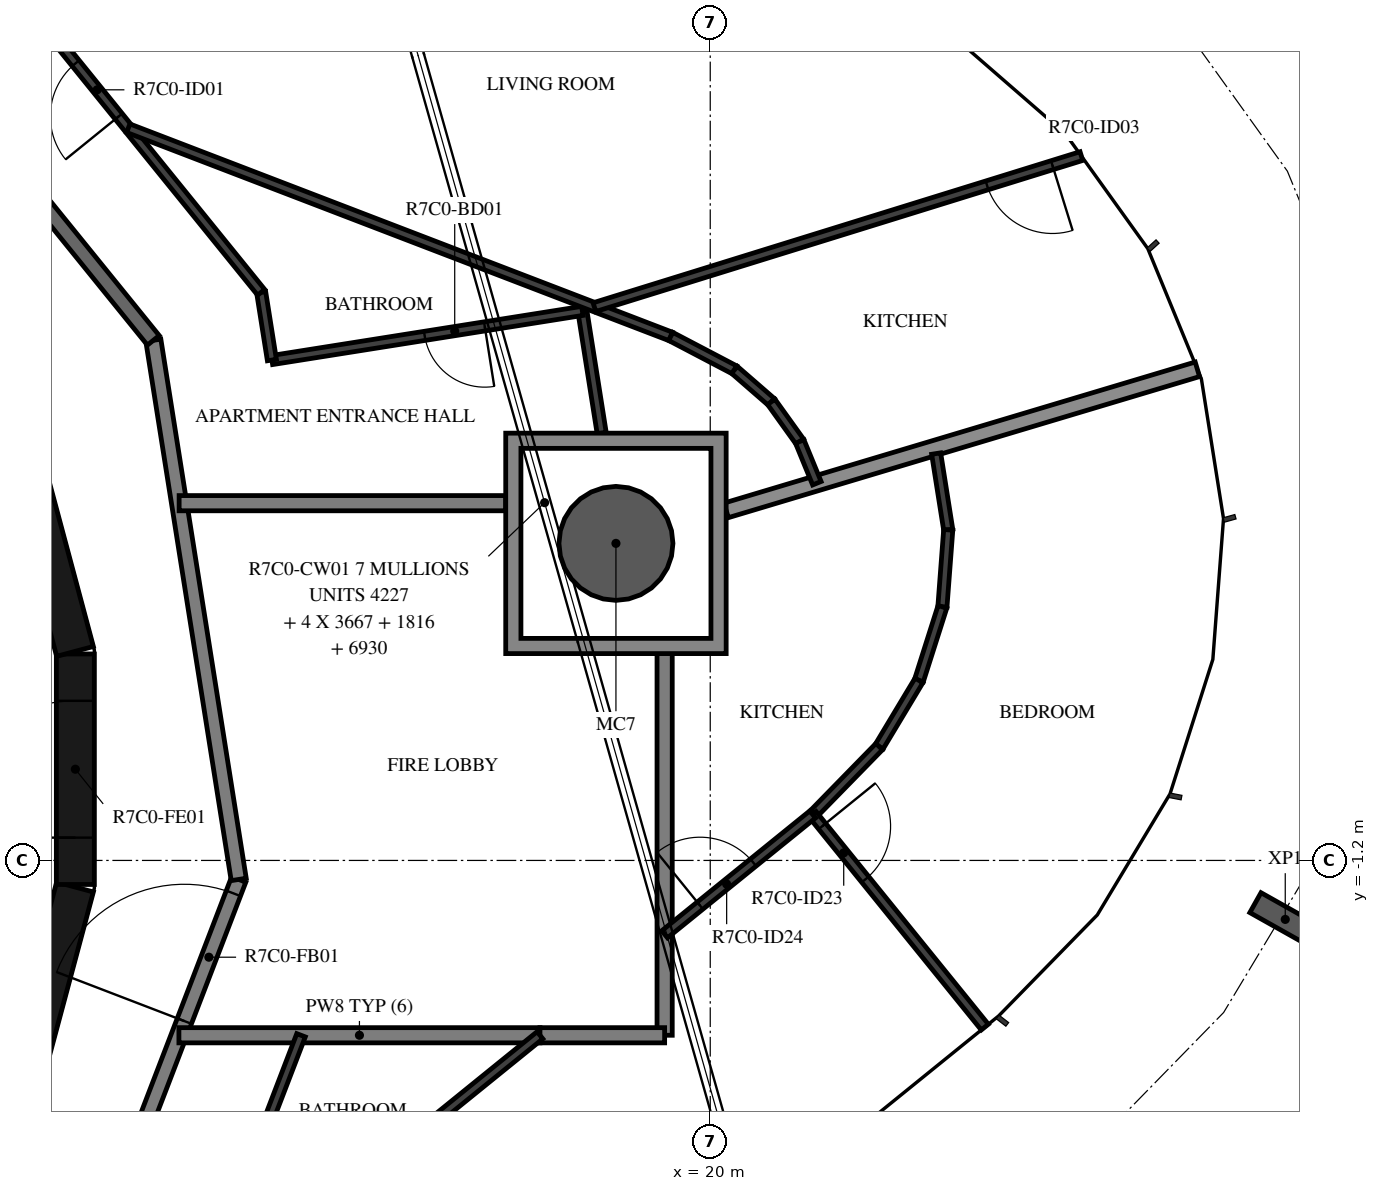
"""IFC4 building model, lengths in metres.
Left out: names, types, materials, properties, quantities, classifications, styles, units other than length and angle.
Written with IfcOpenShell. Run it as: python <this file> out.ifc"""

import sys

from ifc_helpers import new_model, si_unit, direction, frame, frame_2d, origin, origin_2d, place, context, subcontext, project, spatial, polyline, rectangle, hollow_circle, i_section, outline, extrude, element, fill, save


model = new_model("IFC4")
c1 = context("Model", 3, precision=1e-05, world=origin(), true_north=direction((0.0, 1.0)))
c2 = subcontext(c1, "Body", "Model", "MODEL_VIEW")
j1 = project(units=[si_unit("LENGTHUNIT", "METRE"), si_unit("PLANEANGLEUNIT", "RADIAN")], contexts=[c1])
p1 = place(None, origin())
s1 = spatial("IfcSite", under=j1, at=p1, CompositionType="ELEMENT")
p2 = place(p1, origin())
s2 = spatial("IfcBuilding", under=s1, at=p2, CompositionType="ELEMENT")
p3 = place(p2, frame((0.0, 0.0, 284.4)))
s3 = spatial("IfcBuildingStorey", under=s2, at=p3, CompositionType="ELEMENT", Elevation=284.4)
p4 = place(p3, frame((18.76, 2.971, -0.38), z_axis=(0.0, 0.0, 1.0), x_axis=(1.0, 0.0, 0.0)))
e1 = element("IfcColumn", 1, at=p4, inside=s3, PredefinedType="COLUMN", context=c2, shape_type="SweptSolid", body=[
    extrude(hollow_circle(Radius=0.75, WallThickness=0.035, at=origin_2d()), origin(), (0.0, 0.0, 1.0), 3.5),
])
p5 = place(p3, frame((27.565, -1.976, -0.38), z_axis=(0.0, 0.0, 1.0), x_axis=(-0.489802299008, -0.871833532211, 0.0)))
e2 = element("IfcColumn", 2, at=p5, inside=s3, PredefinedType="COLUMN", context=c2, shape_type="SweptSolid", body=[
    extrude(i_section(OverallWidth=0.3, OverallDepth=0.9, WebThickness=0.019, FlangeThickness=0.035, FilletRadius=0.03, at=origin_2d()), origin(), (0.0, 0.0, 1.0), 3.5),
])
p6 = place(p3, frame((10.858, -4.479, 0.0), z_axis=(0.0, 0.0, 1.0), x_axis=(0.258734743916, 0.965948410781, 0.0)))
e3 = element("IfcWall", 3, at=p6, inside=s3, PredefinedType="SHEAR", context=c2, shape_type="SweptSolid", body=[
    extrude(rectangle(XDim=3.033, YDim=0.5, at=frame_2d((1.516, 0.0))), origin(), (0.0, 0.0, 1.0), 3.12),
])
p7 = place(p3, frame((11.647, -1.516, 0.0), z_axis=(0.0, 0.0, 1.0), x_axis=(0.0, 1.0, 0.0)))
e4 = element("IfcWall", 4, at=p7, inside=s3, PredefinedType="SHEAR", context=c2, shape_type="SweptSolid", body=[
    extrude(rectangle(XDim=3.033, YDim=0.5, at=frame_2d((1.516, 0.0))), origin(), (0.0, 0.0, 1.0), 3.12),
])
p8 = place(p7, frame((0.616, 0.0, 0.0)))
e5 = element("IfcOpeningElement", 5, at=p8, cuts=e4, PredefinedType="OPENING", context=c2, shape_type="SweptSolid", body=[
    extrude(rectangle(XDim=1.8, YDim=2.1, at=frame_2d((0.9, 1.05))), frame((0.0, 0.26, 0.0), z_axis=(0.0, -1.0, 0.0), x_axis=(1.0, 0.0, 0.0)), (0.0, 0.0, 1.0), 0.52),
])
p9 = place(p3, frame((11.643, 1.55, 0.0), z_axis=(0.0, 0.0, 1.0), x_axis=(-0.258734743916, 0.965948410781, 0.0)))
e6 = element("IfcWall", 6, at=p9, inside=s3, PredefinedType="SHEAR", context=c2, shape_type="SweptSolid", body=[
    extrude(rectangle(XDim=3.033, YDim=0.5, at=frame_2d((1.516, 0.0))), origin(), (0.0, 0.0, 1.0), 3.12),
])
p10 = place(p3, frame((11.223, -8.154, 0.0), z_axis=(0.0, 0.0, 1.0), x_axis=(0.358341090983, 0.93359073609, 0.0)))
e7 = element("IfcWall", 7, at=p10, inside=s3, PredefinedType="STANDARD", context=c2, shape_type="SweptSolid", body=[
    extrude(rectangle(XDim=7.181, YDim=0.2, at=frame_2d((3.59, 0.0))), origin(), (0.0, 0.0, 1.0), 3.12),
])
p11 = place(p10, frame((5.185, 0.0, 0.0)))
e8 = element("IfcOpeningElement", 8, at=p11, cuts=e7, PredefinedType="OPENING", context=c2, shape_type="SweptSolid", body=[
    extrude(rectangle(XDim=1.8, YDim=2.1, at=frame_2d((0.9, 1.05))), frame((0.0, 0.11, 0.0), z_axis=(0.0, -1.0, 0.0), x_axis=(1.0, 0.0, 0.0)), (0.0, 0.0, 1.0), 0.22),
])
p12 = place(p3, frame((13.797, -1.45, 0.0), z_axis=(0.0, 0.0, 1.0), x_axis=(-0.156421704315, 0.987690361611, 0.0)))
e9 = element("IfcWall", 9, at=p12, inside=s3, PredefinedType="STANDARD", context=c2, shape_type="SweptSolid", body=[
    extrude(rectangle(XDim=7.181, YDim=0.2, at=frame_2d((3.591, 0.0))), origin(), (0.0, 0.0, 1.0), 3.12),
])
p13 = place(p3, frame((12.673, 5.643, 0.0), z_axis=(0.0, 0.0, 1.0), x_axis=(-0.629302871585, 0.777160148113, 0.0)))
e10 = element("IfcWall", 10, at=p13, inside=s3, PredefinedType="STANDARD", context=c2, shape_type="SweptSolid", body=[
    extrude(rectangle(XDim=7.181, YDim=0.2, at=frame_2d((3.59, 0.0))), origin(), (0.0, 0.0, 1.0), 3.12),
])
p14 = place(p13, frame((4.1, 0.0, 0.0)))
e11 = element("IfcOpeningElement", 11, at=p14, cuts=e10, PredefinedType="OPENING", context=c2, shape_type="SweptSolid", body=[
    extrude(rectangle(XDim=1.0, YDim=2.1, at=frame_2d((0.5, 1.05))), frame((0.0, 0.11, 0.0), z_axis=(0.0, -1.0, 0.0), x_axis=(1.0, 0.0, 0.0)), (0.0, 0.0, 1.0), 0.22),
])
p15 = place(p3, frame((17.309, 3.5, 0.0), z_axis=(0.0, 0.0, 1.0), x_axis=(-1.0, 0.0, 0.0)))
e12 = element("IfcWall", 12, at=p15, inside=s3, PredefinedType="STANDARD", context=c2, shape_type="SweptSolid", body=[
    extrude(rectangle(XDim=4.297, YDim=0.2, at=frame_2d((2.148, 0.0))), origin(), (0.0, 0.0, 1.0), 3.12),
])
p16 = place(p3, frame((13.01, -3.5, 0.0), z_axis=(0.0, 0.0, 1.0), x_axis=(1.0, 0.0, 0.0)))
e13 = element("IfcWall", 13, at=p16, inside=s3, PredefinedType="STANDARD", context=c2, shape_type="SweptSolid", body=[
    extrude(rectangle(XDim=4.75, YDim=0.2, at=frame_2d((2.375, 0.0))), origin(), (0.0, 0.0, 1.0), 3.12),
])
p17 = place(p3, frame((19.4, -3.5, 0.0), z_axis=(0.0, 0.0, 1.0), x_axis=(0.0, 1.0, 0.0)))
e14 = element("IfcWall", 14, at=p17, inside=s3, PredefinedType="STANDARD", context=c2, shape_type="SweptSolid", body=[
    extrude(rectangle(XDim=5.021, YDim=0.2, at=frame_2d((2.511, 0.0))), origin(), (0.0, 0.0, 1.0), 3.12),
])
p18 = place(p3, frame((17.76, -3.5, 0.0), z_axis=(0.0, 0.0, 1.0), x_axis=(1.0, 0.0, 0.0)))
e15 = element("IfcWall", 15, at=p18, inside=s3, PredefinedType="STANDARD", context=c2, shape_type="SweptSolid", body=[
    extrude(rectangle(XDim=1.64, YDim=0.2, at=frame_2d((0.82, 0.0))), origin(), (0.0, 0.0, 1.0), 3.12),
])
p19 = place(p3, frame((20.209, 3.405, 0.0), z_axis=(0.0, 0.0, 1.0), x_axis=(0.957991224208, 0.286797514529, 0.0)))
e16 = element("IfcWall", 16, at=p19, inside=s3, PredefinedType="STANDARD", context=c2, shape_type="SweptSolid", body=[
    extrude(rectangle(XDim=6.471, YDim=0.2, at=frame_2d((3.236, 0.0))), origin(), (0.0, 0.0, 1.0), 2.73),
])
p20 = place(p3, frame((18.572, 4.421, 0.0), z_axis=(0.0, 0.0, 1.0), x_axis=(-0.156347444306, 0.987702119396, 0.0)))
e17 = element("IfcWall", 17, at=p20, inside=s3, PredefinedType="PARTITIONING", context=c2, shape_type="SweptSolid", body=[
    extrude(rectangle(XDim=1.629, YDim=0.12, at=frame_2d((0.814, 0.0))), origin(), (0.0, 0.0, 1.0), 3.12),
])
p21 = place(p3, frame((18.317, 6.03, 0.0), z_axis=(0.0, 0.0, 1.0), x_axis=(-0.9876848128, -0.156456737039, 0.0)))
e18 = element("IfcWall", 18, at=p21, inside=s3, PredefinedType="PARTITIONING", context=c2, shape_type="SweptSolid", body=[
    extrude(rectangle(XDim=4.135, YDim=0.12, at=frame_2d((2.068, 0.0))), origin(), (0.0, 0.0, 1.0), 3.12),
])
p22 = place(p21, frame((1.3, 0.0, 0.0)))
e19 = element("IfcOpeningElement", 19, at=p22, cuts=e18, PredefinedType="OPENING", context=c2, shape_type="SweptSolid", body=[
    extrude(rectangle(XDim=0.8, YDim=2.1, at=frame_2d((0.4, 1.05))), frame((0.0, 0.07, 0.0), z_axis=(0.0, -1.0, 0.0), x_axis=(1.0, 0.0, 0.0)), (0.0, 0.0, 1.0), 0.14),
])
p23 = place(p3, frame((14.233, 5.383, 0.0), z_axis=(0.0, 0.0, 1.0), x_axis=(-0.156365428504, 0.987699272435, 0.0)))
e20 = element("IfcWall", 20, at=p23, inside=s3, PredefinedType="PARTITIONING", context=c2, shape_type="SweptSolid", body=[
    extrude(rectangle(XDim=0.902, YDim=0.12, at=frame_2d((0.451, 0.0))), origin(), (0.0, 0.0, 1.0), 3.12),
])
p24 = place(p3, frame((14.092, 6.274, 0.0), z_axis=(0.0, 0.0, 1.0), x_axis=(-0.62933367237, 0.777135206268, 0.0)))
e21 = element("IfcWall", 21, at=p24, inside=s3, PredefinedType="PARTITIONING", context=c2, shape_type="SweptSolid", body=[
    extrude(rectangle(XDim=7.985, YDim=0.12, at=frame_2d((3.992, 0.0))), origin(), (0.0, 0.0, 1.0), 3.12),
])
p25 = place(p24, frame((2.978, 0.0, 0.0)))
e22 = element("IfcOpeningElement", 22, at=p25, cuts=e21, PredefinedType="OPENING", context=c2, shape_type="SweptSolid", body=[
    extrude(rectangle(XDim=0.9, YDim=2.1, at=frame_2d((0.45, 1.05))), frame((0.0, 0.07, 0.0), z_axis=(0.0, -1.0, 0.0), x_axis=(1.0, 0.0, 0.0)), (0.0, 0.0, 1.0), 0.14),
])
p26 = place(p24, frame((4.749, 0.0, 0.0)))
e23 = element("IfcOpeningElement", 23, at=p26, cuts=e21, PredefinedType="OPENING", context=c2, shape_type="SweptSolid", body=[
    extrude(rectangle(XDim=0.9, YDim=2.1, at=frame_2d((0.45, 1.05))), frame((0.0, 0.07, 0.0), z_axis=(0.0, -1.0, 0.0), x_axis=(1.0, 0.0, 0.0)), (0.0, 0.0, 1.0), 0.14),
])
p27 = place(p3, frame((12.344, 8.433, 0.0), z_axis=(0.0, 0.0, 1.0), x_axis=(0.933573435176, -0.358386162029, 0.0)))
e24 = element("IfcWall", 24, at=p27, inside=s3, PredefinedType="PARTITIONING", context=c2, shape_type="SweptSolid", body=[
    extrude(rectangle(XDim=7.644, YDim=0.12, at=frame_2d((3.822, 0.0))), origin(), (0.0, 0.0, 1.0), 3.12),
])
p28 = place(p3, frame((19.48, 5.694, 0.0), z_axis=(0.0, 0.0, 1.0), x_axis=(0.885755816688, -0.464151519662, 0.0)))
e25 = element("IfcWall", 25, at=p28, inside=s3, PredefinedType="PARTITIONING", context=c2, shape_type="SweptSolid", body=[
    extrude(rectangle(XDim=0.947, YDim=0.12, at=frame_2d((0.473, 0.0))), origin(), (0.0, 0.0, 1.0), 3.12),
])
p29 = place(p3, frame((20.319, 5.254, 0.0), z_axis=(0.0, 0.0, 1.0), x_axis=(0.754646464307, -0.656131628493, 0.0)))
e26 = element("IfcWall", 26, at=p29, inside=s3, PredefinedType="PARTITIONING", context=c2, shape_type="SweptSolid", body=[
    extrude(rectangle(XDim=0.642, YDim=0.12, at=frame_2d((0.321, 0.0))), origin(), (0.0, 0.0, 1.0), 3.12),
])
p30 = place(p3, frame((20.803, 4.833, 0.0), z_axis=(0.0, 0.0, 1.0), x_axis=(0.583322588112, -0.812240579014, 0.0)))
e27 = element("IfcWall", 27, at=p30, inside=s3, PredefinedType="PARTITIONING", context=c2, shape_type="SweptSolid", body=[
    extrude(rectangle(XDim=0.642, YDim=0.12, at=frame_2d((0.321, 0.0))), origin(), (0.0, 0.0, 1.0), 3.12),
])
p31 = place(p3, frame((21.177, 4.312, 0.0), z_axis=(0.0, 0.0, 1.0), x_axis=(0.379673715705, -0.925120462212, 0.0)))
e28 = element("IfcWall", 28, at=p31, inside=s3, PredefinedType="PARTITIONING", context=c2, shape_type="SweptSolid", body=[
    extrude(rectangle(XDim=0.594, YDim=0.12, at=frame_2d((0.297, 0.0))), origin(), (0.0, 0.0, 1.0), 3.12),
])
p32 = place(p3, frame((24.883, 8.066, 0.0), z_axis=(0.0, 0.0, 1.0), x_axis=(-0.955106049863, -0.296264127958, 0.0)))
e29 = element("IfcWall", 29, at=p32, inside=s3, PredefinedType="PARTITIONING", context=c2, shape_type="SweptSolid", body=[
    extrude(rectangle(XDim=6.708, YDim=0.12, at=frame_2d((3.354, 0.0))), origin(), (0.0, 0.0, 1.0), 3.12),
])
p33 = place(p32, frame((0.4, 0.0, 0.0)))
e30 = element("IfcOpeningElement", 30, at=p33, cuts=e29, PredefinedType="OPENING", context=c2, shape_type="SweptSolid", body=[
    extrude(rectangle(XDim=0.9, YDim=2.1, at=frame_2d((0.45, 1.05))), frame((0.0, 0.07, 0.0), z_axis=(0.0, -1.0, 0.0), x_axis=(1.0, 0.0, 0.0)), (0.0, 0.0, 1.0), 0.14),
])
p34 = place(p3, frame((12.505, -9.001, 0.0), z_axis=(0.0, 0.0, 1.0), x_axis=(0.358373707046, 0.933578216379, 0.0)))
e31 = element("IfcWall", 31, at=p34, inside=s3, PredefinedType="PARTITIONING", context=c2, shape_type="SweptSolid", body=[
    extrude(rectangle(XDim=5.892, YDim=0.12, at=frame_2d((2.946, 0.0))), origin(), (0.0, 0.0, 1.0), 3.12),
])
p35 = place(p34, frame((0.2, 0.0, 0.0)))
e32 = element("IfcOpeningElement", 32, at=p35, cuts=e31, PredefinedType="OPENING", context=c2, shape_type="SweptSolid", body=[
    extrude(rectangle(XDim=0.9, YDim=2.1, at=frame_2d((0.45, 1.05))), frame((0.0, 0.07, 0.0), z_axis=(0.0, -1.0, 0.0), x_axis=(1.0, 0.0, 0.0)), (0.0, 0.0, 1.0), 0.14),
])
p36 = place(p34, frame((3.436, 0.0, 0.0)))
e33 = element("IfcOpeningElement", 33, at=p36, cuts=e31, PredefinedType="OPENING", context=c2, shape_type="SweptSolid", body=[
    extrude(rectangle(XDim=0.8, YDim=2.1, at=frame_2d((0.4, 1.05))), frame((0.0, 0.07, 0.0), z_axis=(0.0, -1.0, 0.0), x_axis=(1.0, 0.0, 0.0)), (0.0, 0.0, 1.0), 0.14),
])
p37 = place(p3, frame((22.972, 4.153, 0.0), z_axis=(0.0, 0.0, 1.0), x_axis=(0.156209385929, -0.987723963336, 0.0)))
e34 = element("IfcWall", 34, at=p37, inside=s3, PredefinedType="PARTITIONING", context=c2, shape_type="SweptSolid", body=[
    extrude(rectangle(XDim=1.016, YDim=0.12, at=frame_2d((0.508, 0.0))), origin(), (0.0, 0.0, 1.0), 3.12),
])
p38 = place(p3, frame((23.131, 3.149, 0.0), z_axis=(0.0, 0.0, 1.0), x_axis=(-0.075446997935, -0.99714981347, 0.0)))
e35 = element("IfcWall", 35, at=p38, inside=s3, PredefinedType="PARTITIONING", context=c2, shape_type="SweptSolid", body=[
    extrude(rectangle(XDim=1.016, YDim=0.12, at=frame_2d((0.508, 0.0))), origin(), (0.0, 0.0, 1.0), 3.12),
])
p39 = place(p3, frame((23.054, 2.136, 0.0), z_axis=(0.0, 0.0, 1.0), x_axis=(-0.303511129679, -0.952827893253, 0.0)))
e36 = element("IfcWall", 36, at=p39, inside=s3, PredefinedType="PARTITIONING", context=c2, shape_type="SweptSolid", body=[
    extrude(rectangle(XDim=1.016, YDim=0.12, at=frame_2d((0.508, 0.0))), origin(), (0.0, 0.0, 1.0), 3.12),
])
p40 = place(p3, frame((22.746, 1.168, 0.0), z_axis=(0.0, 0.0, 1.0), x_axis=(-0.515096534995, -0.857132171626, 0.0)))
e37 = element("IfcWall", 37, at=p40, inside=s3, PredefinedType="PARTITIONING", context=c2, shape_type="SweptSolid", body=[
    extrude(rectangle(XDim=1.016, YDim=0.12, at=frame_2d((0.508, 0.0))), origin(), (0.0, 0.0, 1.0), 3.12),
])
p41 = place(p3, frame((22.223, 0.298, 0.0), z_axis=(0.0, 0.0, 1.0), x_axis=(-0.69880109182, -0.715316037896, 0.0)))
e38 = element("IfcWall", 38, at=p41, inside=s3, PredefinedType="PARTITIONING", context=c2, shape_type="SweptSolid", body=[
    extrude(rectangle(XDim=1.227, YDim=0.12, at=frame_2d((0.614, 0.0))), origin(), (0.0, 0.0, 1.0), 3.12),
])
p42 = place(p3, frame((21.347, -0.595, 0.0), z_axis=(0.0, 0.0, 1.0), x_axis=(0.62934843781, -0.7771232488, 0.0)))
e39 = element("IfcWall", 39, at=p42, inside=s3, PredefinedType="PARTITIONING", context=c2, shape_type="SweptSolid", body=[
    extrude(rectangle(XDim=3.6, YDim=0.12, at=frame_2d((1.8, 0.0))), origin(), (0.0, 0.0, 1.0), 3.12),
])
p43 = place(p42, frame((0.2, 0.0, 0.0)))
e40 = element("IfcOpeningElement", 40, at=p43, cuts=e39, PredefinedType="OPENING", context=c2, shape_type="SweptSolid", body=[
    extrude(rectangle(XDim=0.9, YDim=2.1, at=frame_2d((0.45, 1.05))), frame((0.0, 0.07, 0.0), z_axis=(0.0, -1.0, 0.0), x_axis=(1.0, 0.0, 0.0)), (0.0, 0.0, 1.0), 0.14),
])
p44 = place(p3, frame((19.4, -2.172, 0.0), z_axis=(0.0, 0.0, 1.0), x_axis=(0.777147279935, 0.629318762862, 0.0)))
e41 = element("IfcWall", 41, at=p44, inside=s3, PredefinedType="PARTITIONING", context=c2, shape_type="SweptSolid", body=[
    extrude(rectangle(XDim=2.505, YDim=0.12, at=frame_2d((1.253, 0.0))), origin(), (0.0, 0.0, 1.0), 3.12),
])
p45 = place(p44, frame((0.6, 0.0, 0.0)))
e42 = element("IfcOpeningElement", 42, at=p45, cuts=e41, PredefinedType="OPENING", context=c2, shape_type="SweptSolid", body=[
    extrude(rectangle(XDim=0.9, YDim=2.1, at=frame_2d((0.45, 1.05))), frame((0.0, 0.07, 0.0), z_axis=(0.0, -1.0, 0.0), x_axis=(1.0, 0.0, 0.0)), (0.0, 0.0, 1.0), 0.14),
])
p46 = place(p3, frame((17.76, -3.5, 0.0), z_axis=(0.0, 0.0, 1.0), x_axis=(-0.777133455716, -0.62933583404, 0.0)))
e43 = element("IfcWall", 43, at=p46, inside=s3, PredefinedType="PARTITIONING", context=c2, shape_type="SweptSolid", body=[
    extrude(rectangle(XDim=5.869, YDim=0.12, at=frame_2d((2.935, 0.0))), origin(), (0.0, 0.0, 1.0), 3.12),
])
p47 = place(p3, origin())
e44 = element("IfcWall", 44, at=p47, inside=s3, PredefinedType="STANDARD", context=c2, shape_type="SweptSolid", body=[
    extrude(outline(polyline([(20.209, 4.421), (20.209, 1.521), (17.309, 1.521), (17.309, 4.421), (20.209, 4.421)]), holes=[polyline([(17.51, 1.721), (20.01, 1.721), (20.01, 4.221), (17.51, 4.221), (17.51, 1.721)])]), origin(), (0.0, 0.0, 1.0), 3.12),
])
p48 = place(p8, origin())
e45 = element("IfcDoor", 45, at=p48, inside=s3, OperationType="DOUBLE_DOOR_SINGLE_SWING", PredefinedType="DOOR", context=c2, shape_type="SweptSolid", body=[
    extrude(rectangle(XDim=1.8, YDim=2.1, at=frame_2d((0.9, 1.05))), frame((0.0, 0.025, 0.0), z_axis=(0.0, -1.0, 0.0), x_axis=(1.0, 0.0, 0.0)), (0.0, 0.0, 1.0), 0.05),
])
fill(e5, e45)
p49 = place(p22, origin())
e46 = element("IfcDoor", 46, at=p49, inside=s3, OperationType="SINGLE_SWING_LEFT", PredefinedType="DOOR", context=c2, shape_type="SweptSolid", body=[
    extrude(rectangle(XDim=0.8, YDim=2.1, at=frame_2d((0.4, 1.05))), frame((0.0, 0.025, 0.0), z_axis=(0.0, -1.0, 0.0), x_axis=(1.0, 0.0, 0.0)), (0.0, 0.0, 1.0), 0.05),
])
fill(e19, e46)
p50 = place(p25, origin())
e47 = element("IfcDoor", 47, at=p50, inside=s3, OperationType="SINGLE_SWING_LEFT", PredefinedType="DOOR", context=c2, shape_type="SweptSolid", body=[
    extrude(rectangle(XDim=0.9, YDim=2.1, at=frame_2d((0.45, 1.05))), frame((0.0, 0.025, 0.0), z_axis=(0.0, -1.0, 0.0), x_axis=(1.0, 0.0, 0.0)), (0.0, 0.0, 1.0), 0.05),
])
fill(e22, e47)
p51 = place(p33, origin())
e48 = element("IfcDoor", 48, at=p51, inside=s3, OperationType="SINGLE_SWING_LEFT", PredefinedType="DOOR", context=c2, shape_type="SweptSolid", body=[
    extrude(rectangle(XDim=0.9, YDim=2.1, at=frame_2d((0.45, 1.05))), frame((0.0, 0.025, 0.0), z_axis=(0.0, -1.0, 0.0), x_axis=(1.0, 0.0, 0.0)), (0.0, 0.0, 1.0), 0.05),
])
fill(e30, e48)
p52 = place(p43, origin())
e49 = element("IfcDoor", 49, at=p52, inside=s3, OperationType="SINGLE_SWING_RIGHT", PredefinedType="DOOR", context=c2, shape_type="SweptSolid", body=[
    extrude(rectangle(XDim=0.9, YDim=2.1, at=frame_2d((0.45, 1.05))), frame((0.0, 0.025, 0.0), z_axis=(0.0, -1.0, 0.0), x_axis=(1.0, 0.0, 0.0)), (0.0, 0.0, 1.0), 0.05),
])
fill(e40, e49)
p53 = place(p45, origin())
e50 = element("IfcDoor", 50, at=p53, inside=s3, OperationType="SINGLE_SWING_LEFT", PredefinedType="DOOR", context=c2, shape_type="SweptSolid", body=[
    extrude(rectangle(XDim=0.9, YDim=2.1, at=frame_2d((0.45, 1.05))), frame((0.0, 0.025, 0.0), z_axis=(0.0, -1.0, 0.0), x_axis=(1.0, 0.0, 0.0)), (0.0, 0.0, 1.0), 0.05),
])
fill(e42, e50)
p54 = place(p11, origin())
e51 = element("IfcDoor", 51, at=p54, inside=s3, OperationType="DOUBLE_DOOR_SINGLE_SWING", PredefinedType="DOOR", context=c2, shape_type="SweptSolid", body=[
    extrude(rectangle(XDim=1.8, YDim=2.1, at=frame_2d((0.9, 1.05))), frame((0.0, 0.025, 0.0), z_axis=(0.0, -1.0, 0.0), x_axis=(1.0, 0.0, 0.0)), (0.0, 0.0, 1.0), 0.05),
])
fill(e8, e51)
save(model, sys.argv[1])
